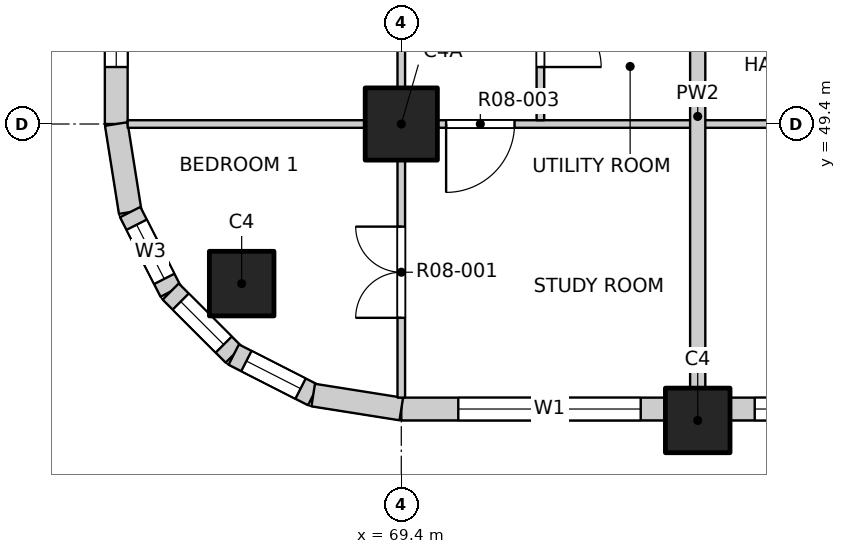
"""IFC4 building model, lengths in metres.
Left out: names, types, materials, properties, quantities, classifications, styles, units other than length and angle.
Written with IfcOpenShell. Run it as: python <this file> out.ifc"""

import sys

from ifc_helpers import new_model, si_unit, direction, frame, frame_2d, origin, origin_2d, place, context, subcontext, project, spatial, rectangle, extrude, element, fill, save


model = new_model("IFC4")
c1 = context("Model", 3, precision=1e-05, world=origin(), true_north=direction((0.0, 1.0)))
c2 = subcontext(c1, "Body", "Model", "MODEL_VIEW")
j1 = project(units=[si_unit("LENGTHUNIT", "METRE"), si_unit("PLANEANGLEUNIT", "RADIAN")], contexts=[c1])
p1 = place(None, origin())
s1 = spatial("IfcSite", under=j1, at=p1, CompositionType="ELEMENT")
p2 = place(p1, origin())
s2 = spatial("IfcBuilding", under=s1, at=p2, CompositionType="ELEMENT")
p3 = place(p2, frame((0.0, 0.0, 99.9)))
s3 = spatial("IfcBuildingStorey", under=s2, at=p3, CompositionType="ELEMENT", Elevation=99.9)
for number, where, z_axis, x_axis in (
    (1, (67.3, 47.3, -0.3), (0.0, 0.0, 1.0), (1.0, 0.0, 0.0)),
    (2, (73.3, 45.5, -0.3), (0.0, 0.0, 1.0), (1.0, 0.0, 0.0)),
):
    element("IfcColumn", number, at=place(p3, frame(where, z_axis=z_axis, x_axis=x_axis)), inside=s3, PredefinedType="COLUMN", context=c2, shape_type="SweptSolid", body=[
        extrude(rectangle(XDim=0.85, YDim=0.85, at=origin_2d()), origin(), (0.0, 0.0, 1.0), 3.45),
    ])
p4 = place(p3, frame((69.4, 49.4, -0.3), z_axis=(0.0, 0.0, 1.0), x_axis=(1.0, 0.0, 0.0)))
e3 = element("IfcColumn", 3, at=p4, inside=s3, PredefinedType="COLUMN", context=c2, shape_type="SweptSolid", body=[
    extrude(rectangle(XDim=0.95, YDim=0.95, at=origin_2d()), origin(), (0.0, 0.0, 1.0), 3.45),
])
p5 = place(p3, frame((69.4, 45.65, 0.0), z_axis=(0.0, 0.0, 1.0), x_axis=(1.0, 0.0, 0.0)))
e4 = element("IfcWall", 4, at=p5, inside=s3, PredefinedType="SOLIDWALL", context=c2, shape_type="SweptSolid", body=[
    extrude(rectangle(XDim=3.475, YDim=0.3, at=frame_2d((1.738, 0.0))), origin(), (0.0, 0.0, 1.0), 2.7),
])
p6 = place(p5, frame((0.75, 0.0, 0.9)))
e5 = element("IfcOpeningElement", 5, at=p6, cuts=e4, PredefinedType="OPENING", context=c2, shape_type="SweptSolid", body=[
    extrude(rectangle(XDim=2.4, YDim=1.8, at=frame_2d((1.2, 0.9))), frame((0.0, 0.16, 0.0), z_axis=(0.0, -1.0, 0.0), x_axis=(1.0, 0.0, 0.0)), (0.0, 0.0, 1.0), 0.32),
])
p7 = place(p3, frame((73.725, 45.65, 0.0), z_axis=(0.0, 0.0, 1.0), x_axis=(1.0, 0.0, 0.0)))
e6 = element("IfcWall", 6, at=p7, inside=s3, PredefinedType="SOLIDWALL", context=c2, shape_type="SweptSolid", body=[
    extrude(rectangle(XDim=6.95, YDim=0.3, at=frame_2d((3.475, 0.0))), origin(), (0.0, 0.0, 1.0), 2.7),
])
p8 = place(p7, frame((0.325, 0.0, 0.9)))
e7 = element("IfcOpeningElement", 7, at=p8, cuts=e6, PredefinedType="OPENING", context=c2, shape_type="SweptSolid", body=[
    extrude(rectangle(XDim=2.4, YDim=1.8, at=frame_2d((1.2, 0.9))), frame((0.0, 0.16, 0.0), z_axis=(0.0, -1.0, 0.0), x_axis=(1.0, 0.0, 0.0)), (0.0, 0.0, 1.0), 0.32),
])
p9 = place(p7, frame((4.225, 0.0, 0.9)))
e8 = element("IfcOpeningElement", 8, at=p9, cuts=e6, PredefinedType="OPENING", context=c2, shape_type="SweptSolid", body=[
    extrude(rectangle(XDim=2.4, YDim=1.8, at=frame_2d((1.2, 0.9))), frame((0.0, 0.16, 0.0), z_axis=(0.0, -1.0, 0.0), x_axis=(1.0, 0.0, 0.0)), (0.0, 0.0, 1.0), 0.32),
])
p10 = place(p3, frame((65.65, 49.4, 0.0), z_axis=(0.0, 0.0, 1.0), x_axis=(0.0, 1.0, 0.0)))
e9 = element("IfcWall", 9, at=p10, inside=s3, PredefinedType="SOLIDWALL", context=c2, shape_type="SweptSolid", body=[
    extrude(rectangle(XDim=3.475, YDim=0.3, at=frame_2d((1.738, 0.0))), origin(), (0.0, 0.0, 1.0), 2.7),
])
p11 = place(p10, frame((0.75, 0.0, 0.9)))
e10 = element("IfcOpeningElement", 10, at=p11, cuts=e9, PredefinedType="OPENING", context=c2, shape_type="SweptSolid", body=[
    extrude(rectangle(XDim=2.4, YDim=1.8, at=frame_2d((1.2, 0.9))), frame((0.0, 0.16, 0.0), z_axis=(0.0, -1.0, 0.0), x_axis=(1.0, 0.0, 0.0)), (0.0, 0.0, 1.0), 0.32),
])
p12 = place(p3, frame((65.65, 49.4, 0.0), z_axis=(0.0, 0.0, 1.0), x_axis=(0.156496880861, -0.987678452879, 0.0)))
e11 = element("IfcWall", 11, at=p12, inside=s3, PredefinedType="SOLIDWALL", context=c2, shape_type="SweptSolid", body=[
    extrude(rectangle(XDim=1.173, YDim=0.3, at=frame_2d((0.586, 0.0))), origin(), (0.0, 0.0, 1.0), 2.7),
])
p13 = place(p3, frame((65.833, 48.241, 0.0), z_axis=(0.0, 0.0, 1.0), x_axis=(0.454025524128, -0.890988677504, 0.0)))
e12 = element("IfcWall", 12, at=p13, inside=s3, PredefinedType="SOLIDWALL", context=c2, shape_type="SweptSolid", body=[
    extrude(rectangle(XDim=1.173, YDim=0.3, at=frame_2d((0.587, 0.0))), origin(), (0.0, 0.0, 1.0), 2.7),
])
p14 = place(p13, frame((0.187, 0.0, 0.9)))
e13 = element("IfcOpeningElement", 13, at=p14, cuts=e12, PredefinedType="OPENING", context=c2, shape_type="SweptSolid", body=[
    extrude(rectangle(XDim=0.8, YDim=1.2, at=frame_2d((0.4, 0.6))), frame((0.0, 0.16, 0.0), z_axis=(0.0, -1.0, 0.0), x_axis=(1.0, 0.0, 0.0)), (0.0, 0.0, 1.0), 0.32),
])
p15 = place(p3, frame((66.366, 47.196, 0.0), z_axis=(0.0, 0.0, 1.0), x_axis=(0.707106781187, -0.707106781187, 0.0)))
e14 = element("IfcWall", 14, at=p15, inside=s3, PredefinedType="SOLIDWALL", context=c2, shape_type="SweptSolid", body=[
    extrude(rectangle(XDim=1.173, YDim=0.3, at=frame_2d((0.586, 0.0))), origin(), (0.0, 0.0, 1.0), 2.7),
])
p16 = place(p15, frame((0.187, 0.0, 0.9)))
e15 = element("IfcOpeningElement", 15, at=p16, cuts=e14, PredefinedType="OPENING", context=c2, shape_type="SweptSolid", body=[
    extrude(rectangle(XDim=0.8, YDim=1.2, at=frame_2d((0.4, 0.6))), frame((0.0, 0.16, 0.0), z_axis=(0.0, -1.0, 0.0), x_axis=(1.0, 0.0, 0.0)), (0.0, 0.0, 1.0), 0.32),
])
p17 = place(p3, frame((67.196, 46.366, 0.0), z_axis=(0.0, 0.0, 1.0), x_axis=(0.890988677504, -0.454025524128, 0.0)))
e16 = element("IfcWall", 16, at=p17, inside=s3, PredefinedType="SOLIDWALL", context=c2, shape_type="SweptSolid", body=[
    extrude(rectangle(XDim=1.173, YDim=0.3, at=frame_2d((0.587, 0.0))), origin(), (0.0, 0.0, 1.0), 2.7),
])
p18 = place(p17, frame((0.187, 0.0, 0.9)))
e17 = element("IfcOpeningElement", 17, at=p18, cuts=e16, PredefinedType="OPENING", context=c2, shape_type="SweptSolid", body=[
    extrude(rectangle(XDim=0.8, YDim=1.2, at=frame_2d((0.4, 0.6))), frame((0.0, 0.16, 0.0), z_axis=(0.0, -1.0, 0.0), x_axis=(1.0, 0.0, 0.0)), (0.0, 0.0, 1.0), 0.32),
])
p19 = place(p3, frame((68.241, 45.833, 0.0), z_axis=(0.0, 0.0, 1.0), x_axis=(0.987678452879, -0.156496880861, 0.0)))
e18 = element("IfcWall", 18, at=p19, inside=s3, PredefinedType="SOLIDWALL", context=c2, shape_type="SweptSolid", body=[
    extrude(rectangle(XDim=1.173, YDim=0.3, at=frame_2d((0.586, 0.0))), origin(), (0.0, 0.0, 1.0), 2.7),
])
p20 = place(p3, frame((65.8, 49.4, 0.0), z_axis=(0.0, 0.0, 1.0), x_axis=(1.0, 0.0, 0.0)))
e19 = element("IfcWall", 19, at=p20, inside=s3, PredefinedType="PARTITIONING", context=c2, shape_type="SweptSolid", body=[
    extrude(rectangle(XDim=38.4, YDim=0.1, at=frame_2d((19.2, 0.0))), origin(), (0.0, 0.0, 1.0), 3.15),
])
p21 = place(p20, frame((4.19, 0.0, 0.0)))
e20 = element("IfcOpeningElement", 20, at=p21, cuts=e19, PredefinedType="OPENING", context=c2, shape_type="SweptSolid", body=[
    extrude(rectangle(XDim=0.9, YDim=2.1, at=frame_2d((0.45, 1.05))), frame((0.0, 0.06, 0.0), z_axis=(0.0, -1.0, 0.0), x_axis=(1.0, 0.0, 0.0)), (0.0, 0.0, 1.0), 0.12),
])
p22 = place(p20, frame((9.0, 0.0, 0.0)))
e21 = element("IfcOpeningElement", 21, at=p22, cuts=e19, PredefinedType="OPENING", context=c2, shape_type="SweptSolid", body=[
    extrude(rectangle(XDim=0.9, YDim=2.1, at=frame_2d((0.45, 1.05))), frame((0.0, 0.06, 0.0), z_axis=(0.0, -1.0, 0.0), x_axis=(1.0, 0.0, 0.0)), (0.0, 0.0, 1.0), 0.12),
])
p23 = place(p20, frame((12.9, 0.0, 0.0)))
e22 = element("IfcOpeningElement", 22, at=p23, cuts=e19, PredefinedType="OPENING", context=c2, shape_type="SweptSolid", body=[
    extrude(rectangle(XDim=0.9, YDim=2.1, at=frame_2d((0.45, 1.05))), frame((0.0, 0.06, 0.0), z_axis=(0.0, -1.0, 0.0), x_axis=(1.0, 0.0, 0.0)), (0.0, 0.0, 1.0), 0.12),
])
p24 = place(p20, frame((16.8, 0.0, 0.0)))
e23 = element("IfcOpeningElement", 23, at=p24, cuts=e19, PredefinedType="OPENING", context=c2, shape_type="SweptSolid", body=[
    extrude(rectangle(XDim=0.9, YDim=2.1, at=frame_2d((0.45, 1.05))), frame((0.0, 0.06, 0.0), z_axis=(0.0, -1.0, 0.0), x_axis=(1.0, 0.0, 0.0)), (0.0, 0.0, 1.0), 0.12),
])
p25 = place(p20, frame((20.7, 0.0, 0.0)))
e24 = element("IfcOpeningElement", 24, at=p25, cuts=e19, PredefinedType="OPENING", context=c2, shape_type="SweptSolid", body=[
    extrude(rectangle(XDim=0.9, YDim=2.1, at=frame_2d((0.45, 1.05))), frame((0.0, 0.06, 0.0), z_axis=(0.0, -1.0, 0.0), x_axis=(1.0, 0.0, 0.0)), (0.0, 0.0, 1.0), 0.12),
])
p26 = place(p20, frame((24.6, 0.0, 0.0)))
e25 = element("IfcOpeningElement", 25, at=p26, cuts=e19, PredefinedType="OPENING", context=c2, shape_type="SweptSolid", body=[
    extrude(rectangle(XDim=0.9, YDim=2.1, at=frame_2d((0.45, 1.05))), frame((0.0, 0.06, 0.0), z_axis=(0.0, -1.0, 0.0), x_axis=(1.0, 0.0, 0.0)), (0.0, 0.0, 1.0), 0.12),
])
p27 = place(p20, frame((28.5, 0.0, 0.0)))
e26 = element("IfcOpeningElement", 26, at=p27, cuts=e19, PredefinedType="OPENING", context=c2, shape_type="SweptSolid", body=[
    extrude(rectangle(XDim=0.9, YDim=2.1, at=frame_2d((0.45, 1.05))), frame((0.0, 0.06, 0.0), z_axis=(0.0, -1.0, 0.0), x_axis=(1.0, 0.0, 0.0)), (0.0, 0.0, 1.0), 0.12),
])
p28 = place(p20, frame((33.31, 0.0, 0.0)))
e27 = element("IfcOpeningElement", 27, at=p28, cuts=e19, PredefinedType="OPENING", context=c2, shape_type="SweptSolid", body=[
    extrude(rectangle(XDim=0.9, YDim=2.1, at=frame_2d((0.45, 1.05))), frame((0.0, 0.06, 0.0), z_axis=(0.0, -1.0, 0.0), x_axis=(1.0, 0.0, 0.0)), (0.0, 0.0, 1.0), 0.12),
])
p29 = place(p3, frame((69.4, 45.8, 0.0), z_axis=(0.0, 0.0, 1.0), x_axis=(0.0, 1.0, 0.0)))
e28 = element("IfcWall", 28, at=p29, inside=s3, PredefinedType="PARTITIONING", context=c2, shape_type="SweptSolid", body=[
    extrude(rectangle(XDim=38.4, YDim=0.1, at=frame_2d((19.2, 0.0))), origin(), (0.0, 0.0, 1.0), 3.15),
])
p30 = place(p29, frame((1.05, 0.0, 0.0)))
e29 = element("IfcOpeningElement", 29, at=p30, cuts=e28, PredefinedType="OPENING", context=c2, shape_type="SweptSolid", body=[
    extrude(rectangle(XDim=1.2, YDim=2.1, at=frame_2d((0.6, 1.05))), frame((0.0, 0.06, 0.0), z_axis=(0.0, -1.0, 0.0), x_axis=(1.0, 0.0, 0.0)), (0.0, 0.0, 1.0), 0.12),
])
p31 = place(p29, frame((5.1, 0.0, 0.0)))
e30 = element("IfcOpeningElement", 30, at=p31, cuts=e28, PredefinedType="OPENING", context=c2, shape_type="SweptSolid", body=[
    extrude(rectangle(XDim=0.9, YDim=2.1, at=frame_2d((0.45, 1.05))), frame((0.0, 0.06, 0.0), z_axis=(0.0, -1.0, 0.0), x_axis=(1.0, 0.0, 0.0)), (0.0, 0.0, 1.0), 0.12),
])
p32 = place(p29, frame((9.0, 0.0, 0.0)))
e31 = element("IfcOpeningElement", 31, at=p32, cuts=e28, PredefinedType="OPENING", context=c2, shape_type="SweptSolid", body=[
    extrude(rectangle(XDim=0.9, YDim=2.1, at=frame_2d((0.45, 1.05))), frame((0.0, 0.06, 0.0), z_axis=(0.0, -1.0, 0.0), x_axis=(1.0, 0.0, 0.0)), (0.0, 0.0, 1.0), 0.12),
])
p33 = place(p29, frame((12.9, 0.0, 0.0)))
e32 = element("IfcOpeningElement", 32, at=p33, cuts=e28, PredefinedType="OPENING", context=c2, shape_type="SweptSolid", body=[
    extrude(rectangle(XDim=0.9, YDim=2.1, at=frame_2d((0.45, 1.05))), frame((0.0, 0.06, 0.0), z_axis=(0.0, -1.0, 0.0), x_axis=(1.0, 0.0, 0.0)), (0.0, 0.0, 1.0), 0.12),
])
p34 = place(p29, frame((16.8, 0.0, 0.0)))
e33 = element("IfcOpeningElement", 33, at=p34, cuts=e28, PredefinedType="OPENING", context=c2, shape_type="SweptSolid", body=[
    extrude(rectangle(XDim=0.9, YDim=2.1, at=frame_2d((0.45, 1.05))), frame((0.0, 0.06, 0.0), z_axis=(0.0, -1.0, 0.0), x_axis=(1.0, 0.0, 0.0)), (0.0, 0.0, 1.0), 0.12),
])
p35 = place(p29, frame((20.7, 0.0, 0.0)))
e34 = element("IfcOpeningElement", 34, at=p35, cuts=e28, PredefinedType="OPENING", context=c2, shape_type="SweptSolid", body=[
    extrude(rectangle(XDim=0.9, YDim=2.1, at=frame_2d((0.45, 1.05))), frame((0.0, 0.06, 0.0), z_axis=(0.0, -1.0, 0.0), x_axis=(1.0, 0.0, 0.0)), (0.0, 0.0, 1.0), 0.12),
])
p36 = place(p29, frame((24.6, 0.0, 0.0)))
e35 = element("IfcOpeningElement", 35, at=p36, cuts=e28, PredefinedType="OPENING", context=c2, shape_type="SweptSolid", body=[
    extrude(rectangle(XDim=0.9, YDim=2.1, at=frame_2d((0.45, 1.05))), frame((0.0, 0.06, 0.0), z_axis=(0.0, -1.0, 0.0), x_axis=(1.0, 0.0, 0.0)), (0.0, 0.0, 1.0), 0.12),
])
p37 = place(p29, frame((28.5, 0.0, 0.0)))
e36 = element("IfcOpeningElement", 36, at=p37, cuts=e28, PredefinedType="OPENING", context=c2, shape_type="SweptSolid", body=[
    extrude(rectangle(XDim=0.9, YDim=2.1, at=frame_2d((0.45, 1.05))), frame((0.0, 0.06, 0.0), z_axis=(0.0, -1.0, 0.0), x_axis=(1.0, 0.0, 0.0)), (0.0, 0.0, 1.0), 0.12),
])
p38 = place(p29, frame((32.4, 0.0, 0.0)))
e37 = element("IfcOpeningElement", 37, at=p38, cuts=e28, PredefinedType="OPENING", context=c2, shape_type="SweptSolid", body=[
    extrude(rectangle(XDim=0.9, YDim=2.1, at=frame_2d((0.45, 1.05))), frame((0.0, 0.06, 0.0), z_axis=(0.0, -1.0, 0.0), x_axis=(1.0, 0.0, 0.0)), (0.0, 0.0, 1.0), 0.12),
])
p39 = place(p29, frame((36.15, 0.0, 0.0)))
e38 = element("IfcOpeningElement", 38, at=p39, cuts=e28, PredefinedType="OPENING", context=c2, shape_type="SweptSolid", body=[
    extrude(rectangle(XDim=1.2, YDim=2.1, at=frame_2d((0.6, 1.05))), frame((0.0, 0.06, 0.0), z_axis=(0.0, -1.0, 0.0), x_axis=(1.0, 0.0, 0.0)), (0.0, 0.0, 1.0), 0.12),
])
p40 = place(p3, frame((71.23, 49.45, 0.0), z_axis=(0.0, 0.0, 1.0), x_axis=(0.0, 1.0, 0.0)))
e39 = element("IfcWall", 39, at=p40, inside=s3, PredefinedType="PARTITIONING", context=c2, shape_type="SweptSolid", body=[
    extrude(rectangle(XDim=9.05, YDim=0.1, at=frame_2d((4.525, 0.0))), origin(), (0.0, 0.0, 1.0), 3.15),
])
p41 = place(p40, frame((0.7, 0.0, 0.0)))
e40 = element("IfcOpeningElement", 40, at=p41, cuts=e39, PredefinedType="OPENING", context=c2, shape_type="SweptSolid", body=[
    extrude(rectangle(XDim=0.8, YDim=2.1, at=frame_2d((0.4, 1.05))), frame((0.0, 0.06, 0.0), z_axis=(0.0, -1.0, 0.0), x_axis=(1.0, 0.0, 0.0)), (0.0, 0.0, 1.0), 0.12),
])
p42 = place(p40, frame((3.0, 0.0, 0.0)))
e41 = element("IfcOpeningElement", 41, at=p42, cuts=e39, PredefinedType="OPENING", context=c2, shape_type="SweptSolid", body=[
    extrude(rectangle(XDim=0.9, YDim=2.1, at=frame_2d((0.45, 1.05))), frame((0.0, 0.06, 0.0), z_axis=(0.0, -1.0, 0.0), x_axis=(1.0, 0.0, 0.0)), (0.0, 0.0, 1.0), 0.12),
])
p43 = place(p40, frame((5.575, 0.0, 0.0)))
e42 = element("IfcOpeningElement", 42, at=p43, cuts=e39, PredefinedType="OPENING", context=c2, shape_type="SweptSolid", body=[
    extrude(rectangle(XDim=0.8, YDim=2.1, at=frame_2d((0.4, 1.05))), frame((0.0, 0.06, 0.0), z_axis=(0.0, -1.0, 0.0), x_axis=(1.0, 0.0, 0.0)), (0.0, 0.0, 1.0), 0.12),
])
p44 = place(p40, frame((7.75, 0.0, 0.0)))
e43 = element("IfcOpeningElement", 43, at=p44, cuts=e39, PredefinedType="OPENING", context=c2, shape_type="SweptSolid", body=[
    extrude(rectangle(XDim=0.9, YDim=2.1, at=frame_2d((0.45, 1.05))), frame((0.0, 0.06, 0.0), z_axis=(0.0, -1.0, 0.0), x_axis=(1.0, 0.0, 0.0)), (0.0, 0.0, 1.0), 0.12),
])
p45 = place(p3, frame((73.3, 45.8, 0.0), z_axis=(0.0, 0.0, 1.0), x_axis=(0.0, 1.0, 0.0)))
e44 = element("IfcWall", 44, at=p45, inside=s3, PredefinedType="PARTITIONING", context=c2, shape_type="SweptSolid", body=[
    extrude(rectangle(XDim=7.4, YDim=0.2, at=frame_2d((3.7, 0.0))), origin(), (0.0, 0.0, 1.0), 3.15),
])
p46 = place(p6, origin())
e45 = element("IfcWindow", 45, at=p46, inside=s3, PartitioningType="DOUBLE_PANEL_VERTICAL", PredefinedType="WINDOW", context=c2, shape_type="SweptSolid", body=[
    extrude(rectangle(XDim=2.4, YDim=1.8, at=frame_2d((1.2, 0.9))), frame((0.0, 0.03, 0.0), z_axis=(0.0, -1.0, 0.0), x_axis=(1.0, 0.0, 0.0)), (0.0, 0.0, 1.0), 0.06),
])
fill(e5, e45)
p47 = place(p8, origin())
e46 = element("IfcWindow", 46, at=p47, inside=s3, PartitioningType="DOUBLE_PANEL_VERTICAL", PredefinedType="WINDOW", context=c2, shape_type="SweptSolid", body=[
    extrude(rectangle(XDim=2.4, YDim=1.8, at=frame_2d((1.2, 0.9))), frame((0.0, 0.03, 0.0), z_axis=(0.0, -1.0, 0.0), x_axis=(1.0, 0.0, 0.0)), (0.0, 0.0, 1.0), 0.06),
])
fill(e7, e46)
p48 = place(p11, origin())
e47 = element("IfcWindow", 47, at=p48, inside=s3, PartitioningType="DOUBLE_PANEL_VERTICAL", PredefinedType="WINDOW", context=c2, shape_type="SweptSolid", body=[
    extrude(rectangle(XDim=2.4, YDim=1.8, at=frame_2d((1.2, 0.9))), frame((0.0, 0.03, 0.0), z_axis=(0.0, -1.0, 0.0), x_axis=(1.0, 0.0, 0.0)), (0.0, 0.0, 1.0), 0.06),
])
fill(e10, e47)
p49 = place(p14, origin())
e48 = element("IfcWindow", 48, at=p49, inside=s3, PartitioningType="SINGLE_PANEL", PredefinedType="WINDOW", context=c2, shape_type="SweptSolid", body=[
    extrude(rectangle(XDim=0.8, YDim=1.2, at=frame_2d((0.4, 0.6))), frame((0.0, 0.03, 0.0), z_axis=(0.0, -1.0, 0.0), x_axis=(1.0, 0.0, 0.0)), (0.0, 0.0, 1.0), 0.06),
])
fill(e13, e48)
p50 = place(p16, origin())
e49 = element("IfcWindow", 49, at=p50, inside=s3, PartitioningType="SINGLE_PANEL", PredefinedType="WINDOW", context=c2, shape_type="SweptSolid", body=[
    extrude(rectangle(XDim=0.8, YDim=1.2, at=frame_2d((0.4, 0.6))), frame((0.0, 0.03, 0.0), z_axis=(0.0, -1.0, 0.0), x_axis=(1.0, 0.0, 0.0)), (0.0, 0.0, 1.0), 0.06),
])
fill(e15, e49)
p51 = place(p18, origin())
e50 = element("IfcWindow", 50, at=p51, inside=s3, PartitioningType="SINGLE_PANEL", PredefinedType="WINDOW", context=c2, shape_type="SweptSolid", body=[
    extrude(rectangle(XDim=0.8, YDim=1.2, at=frame_2d((0.4, 0.6))), frame((0.0, 0.03, 0.0), z_axis=(0.0, -1.0, 0.0), x_axis=(1.0, 0.0, 0.0)), (0.0, 0.0, 1.0), 0.06),
])
fill(e17, e50)
p52 = place(p30, origin())
e51 = element("IfcDoor", 51, at=p52, inside=s3, OperationType="DOUBLE_DOOR_SINGLE_SWING", PredefinedType="DOOR", context=c2, shape_type="SweptSolid", body=[
    extrude(rectangle(XDim=1.2, YDim=2.1, at=frame_2d((0.6, 1.05))), frame((0.0, 0.025, 0.0), z_axis=(0.0, -1.0, 0.0), x_axis=(1.0, 0.0, 0.0)), (0.0, 0.0, 1.0), 0.05),
])
fill(e29, e51)
p53 = place(p21, origin())
e52 = element("IfcDoor", 52, at=p53, inside=s3, OperationType="SINGLE_SWING_RIGHT", PredefinedType="DOOR", context=c2, shape_type="SweptSolid", body=[
    extrude(rectangle(XDim=0.9, YDim=2.1, at=frame_2d((0.45, 1.05))), frame((0.0, 0.025, 0.0), z_axis=(0.0, -1.0, 0.0), x_axis=(1.0, 0.0, 0.0)), (0.0, 0.0, 1.0), 0.05),
])
fill(e20, e52)
p54 = place(p41, origin())
e53 = element("IfcDoor", 53, at=p54, inside=s3, OperationType="SINGLE_SWING_RIGHT", PredefinedType="DOOR", context=c2, shape_type="SweptSolid", body=[
    extrude(rectangle(XDim=0.8, YDim=2.1, at=frame_2d((0.4, 1.05))), frame((0.0, 0.025, 0.0), z_axis=(0.0, -1.0, 0.0), x_axis=(1.0, 0.0, 0.0)), (0.0, 0.0, 1.0), 0.05),
])
fill(e40, e53)
save(model, sys.argv[1])
